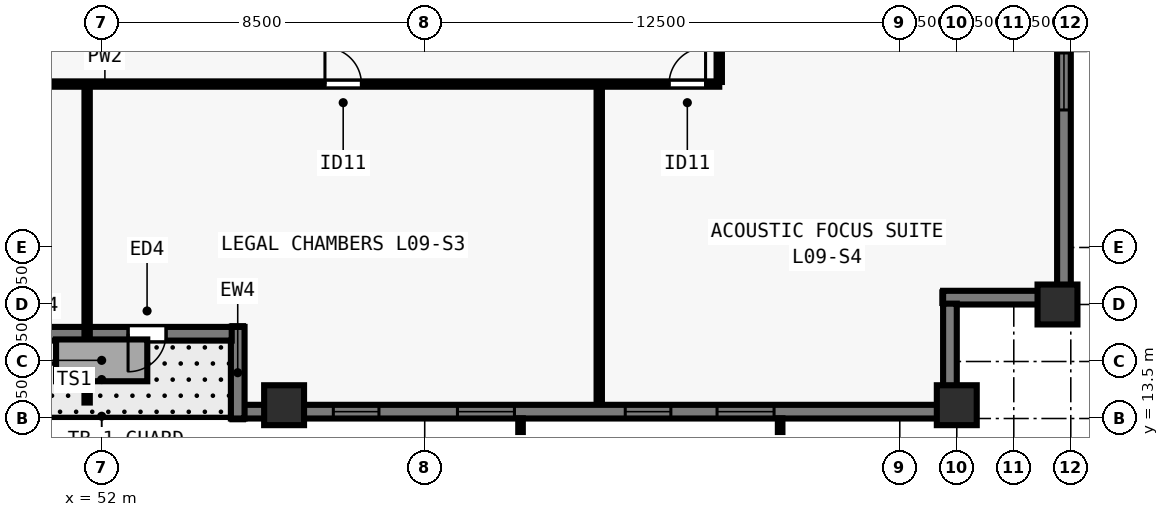
"""IFC4 building model, lengths in metres.
Left out: names, types, materials, properties, quantities, classifications, styles, units other than length and angle.
Written with IfcOpenShell. Run it as: python <this file> out.ifc"""

import sys

from ifc_helpers import new_model, si_unit, direction, frame, frame_2d, origin, origin_2d, place, context, subcontext, project, spatial, rectangle, extrude, element, fill, save


model = new_model("IFC4")
c1 = context("Model", 3, precision=1e-05, world=origin(), true_north=direction((0.0, 1.0)))
c2 = subcontext(c1, "Body", "Model", "MODEL_VIEW")
j1 = project(units=[si_unit("LENGTHUNIT", "METRE"), si_unit("PLANEANGLEUNIT", "RADIAN")], contexts=[c1])
p1 = place(None, origin())
s1 = spatial("IfcSite", under=j1, at=p1, CompositionType="ELEMENT")
p2 = place(p1, origin())
s2 = spatial("IfcBuilding", under=s1, at=p2, CompositionType="ELEMENT")
p3 = place(p2, frame((0.0, 0.0, 37.5)))
s3 = spatial("IfcBuildingStorey", under=s2, at=p3, CompositionType="ELEMENT", Elevation=37.5)
for number, where, z_axis, x_axis in (
    (1, (56.8, 13.85, 0.0), (0.0, 0.0, 1.0), (1.0, 0.0, 0.0)),
    (2, (74.5, 13.85, 0.0), (0.0, 0.0, 1.0), (1.0, 0.0, 0.0)),
    (3, (77.15, 16.5, 0.0), (0.0, 0.0, 1.0), (0.0, 1.0, 0.0)),
):
    element("IfcColumn", number, at=place(p3, frame(where, z_axis=z_axis, x_axis=x_axis)), inside=s3, PredefinedType="COLUMN", context=c2, shape_type="SweptSolid", body=[
        extrude(rectangle(XDim=1.05, YDim=1.05, at=origin_2d()), origin(), (0.0, 0.0, 1.0), 3.5),
    ])
p4 = place(p3, frame((77.32, 61.5, 0.0), z_axis=(0.0, 0.0, 1.0), x_axis=(0.0, -1.0, 0.0)))
e4 = element("IfcWall", 4, at=p4, inside=s3, PredefinedType="SOLIDWALL", context=c2, shape_type="SweptSolid", body=[
    extrude(rectangle(XDim=44.662, YDim=0.36, at=frame_2d((22.331, 0.0))), origin(), (0.0, 0.0, 1.0), 3.28),
])
p5 = place(p4, frame((4.78, 0.0, 0.8)))
e5 = element("IfcOpeningElement", 5, at=p5, cuts=e4, PredefinedType="OPENING", context=c2, shape_type="SweptSolid", body=[
    extrude(rectangle(XDim=1.5, YDim=1.544, at=frame_2d((0.75, 0.772))), frame((0.0, 0.19, 0.0), z_axis=(0.0, -1.0, 0.0), x_axis=(1.0, 0.0, 0.0)), (0.0, 0.0, 1.0), 0.38),
])
p6 = place(p4, frame((8.29, 0.0, 0.8)))
e6 = element("IfcOpeningElement", 6, at=p6, cuts=e4, PredefinedType="OPENING", context=c2, shape_type="SweptSolid", body=[
    extrude(rectangle(XDim=1.2, YDim=1.544, at=frame_2d((0.6, 0.772))), frame((0.0, 0.19, 0.0), z_axis=(0.0, -1.0, 0.0), x_axis=(1.0, 0.0, 0.0)), (0.0, 0.0, 1.0), 0.38),
])
p7 = place(p4, frame((11.5, 0.0, 0.8)))
e7 = element("IfcOpeningElement", 7, at=p7, cuts=e4, PredefinedType="OPENING", context=c2, shape_type="SweptSolid", body=[
    extrude(rectangle(XDim=1.5, YDim=1.544, at=frame_2d((0.75, 0.772))), frame((0.0, 0.19, 0.0), z_axis=(0.0, -1.0, 0.0), x_axis=(1.0, 0.0, 0.0)), (0.0, 0.0, 1.0), 0.38),
])
p8 = place(p4, frame((15.01, 0.0, 0.8)))
e8 = element("IfcOpeningElement", 8, at=p8, cuts=e4, PredefinedType="OPENING", context=c2, shape_type="SweptSolid", body=[
    extrude(rectangle(XDim=1.2, YDim=1.544, at=frame_2d((0.6, 0.772))), frame((0.0, 0.19, 0.0), z_axis=(0.0, -1.0, 0.0), x_axis=(1.0, 0.0, 0.0)), (0.0, 0.0, 1.0), 0.38),
])
p9 = place(p4, frame((18.671, 0.0, 0.8)))
e9 = element("IfcOpeningElement", 9, at=p9, cuts=e4, PredefinedType="OPENING", context=c2, shape_type="SweptSolid", body=[
    extrude(rectangle(XDim=1.5, YDim=1.544, at=frame_2d((0.75, 0.772))), frame((0.0, 0.19, 0.0), z_axis=(0.0, -1.0, 0.0), x_axis=(1.0, 0.0, 0.0)), (0.0, 0.0, 1.0), 0.38),
])
p10 = place(p4, frame((22.581, 0.0, 0.8)))
e10 = element("IfcOpeningElement", 10, at=p10, cuts=e4, PredefinedType="OPENING", context=c2, shape_type="SweptSolid", body=[
    extrude(rectangle(XDim=1.2, YDim=1.544, at=frame_2d((0.6, 0.772))), frame((0.0, 0.19, 0.0), z_axis=(0.0, -1.0, 0.0), x_axis=(1.0, 0.0, 0.0)), (0.0, 0.0, 1.0), 0.38),
])
p11 = place(p4, frame((24.941, 0.0, 0.8)))
e11 = element("IfcOpeningElement", 11, at=p11, cuts=e4, PredefinedType="OPENING", context=c2, shape_type="SweptSolid", body=[
    extrude(rectangle(XDim=1.5, YDim=1.544, at=frame_2d((0.75, 0.772))), frame((0.0, 0.19, 0.0), z_axis=(0.0, -1.0, 0.0), x_axis=(1.0, 0.0, 0.0)), (0.0, 0.0, 1.0), 0.38),
])
p12 = place(p4, frame((28.451, 0.0, 0.8)))
e12 = element("IfcOpeningElement", 12, at=p12, cuts=e4, PredefinedType="OPENING", context=c2, shape_type="SweptSolid", body=[
    extrude(rectangle(XDim=1.2, YDim=1.544, at=frame_2d((0.6, 0.772))), frame((0.0, 0.19, 0.0), z_axis=(0.0, -1.0, 0.0), x_axis=(1.0, 0.0, 0.0)), (0.0, 0.0, 1.0), 0.38),
])
p13 = place(p4, frame((31.662, 0.0, 0.8)))
e13 = element("IfcOpeningElement", 13, at=p13, cuts=e4, PredefinedType="OPENING", context=c2, shape_type="SweptSolid", body=[
    extrude(rectangle(XDim=1.5, YDim=1.544, at=frame_2d((0.75, 0.772))), frame((0.0, 0.19, 0.0), z_axis=(0.0, -1.0, 0.0), x_axis=(1.0, 0.0, 0.0)), (0.0, 0.0, 1.0), 0.38),
])
p14 = place(p4, frame((35.172, 0.0, 0.8)))
e14 = element("IfcOpeningElement", 14, at=p14, cuts=e4, PredefinedType="OPENING", context=c2, shape_type="SweptSolid", body=[
    extrude(rectangle(XDim=1.2, YDim=1.544, at=frame_2d((0.6, 0.772))), frame((0.0, 0.19, 0.0), z_axis=(0.0, -1.0, 0.0), x_axis=(1.0, 0.0, 0.0)), (0.0, 0.0, 1.0), 0.38),
])
p15 = place(p4, frame((38.382, 0.0, 0.8)))
e15 = element("IfcOpeningElement", 15, at=p15, cuts=e4, PredefinedType="OPENING", context=c2, shape_type="SweptSolid", body=[
    extrude(rectangle(XDim=1.5, YDim=1.544, at=frame_2d((0.75, 0.772))), frame((0.0, 0.19, 0.0), z_axis=(0.0, -1.0, 0.0), x_axis=(1.0, 0.0, 0.0)), (0.0, 0.0, 1.0), 0.38),
])
p16 = place(p3, frame((77.5, 16.68, 0.0), z_axis=(0.0, 0.0, 1.0), x_axis=(-1.0, 0.0, 0.0)))
e16 = element("IfcWall", 16, at=p16, inside=s3, PredefinedType="SOLIDWALL", context=c2, shape_type="SweptSolid", body=[
    extrude(rectangle(XDim=3.36, YDim=0.36, at=frame_2d((1.68, 0.0))), origin(), (0.0, 0.0, 1.0), 3.28),
])
p17 = place(p3, frame((74.32, 16.522, 0.0), z_axis=(0.0, 0.0, 1.0), x_axis=(0.0, -1.0, 0.0)))
e17 = element("IfcWall", 17, at=p17, inside=s3, PredefinedType="SOLIDWALL", context=c2, shape_type="SweptSolid", body=[
    extrude(rectangle(XDim=2.684, YDim=0.36, at=frame_2d((1.342, 0.0))), origin(), (0.0, 0.0, 1.0), 3.28),
])
p18 = place(p3, frame((74.5, 13.68, 0.0), z_axis=(0.0, 0.0, 1.0), x_axis=(-1.0, 0.0, 0.0)))
e18 = element("IfcWall", 18, at=p18, inside=s3, PredefinedType="SOLIDWALL", context=c2, shape_type="SweptSolid", body=[
    extrude(rectangle(XDim=18.762, YDim=0.36, at=frame_2d((9.381, 0.0))), origin(), (0.0, 0.0, 1.0), 3.28),
])
p19 = place(p18, frame((4.808, 0.0, 0.8)))
e19 = element("IfcOpeningElement", 19, at=p19, cuts=e18, PredefinedType="OPENING", context=c2, shape_type="SweptSolid", body=[
    extrude(rectangle(XDim=1.5, YDim=1.544, at=frame_2d((0.75, 0.772))), frame((0.0, 0.19, 0.0), z_axis=(0.0, -1.0, 0.0), x_axis=(1.0, 0.0, 0.0)), (0.0, 0.0, 1.0), 0.38),
])
p20 = place(p18, frame((7.523, 0.0, 0.8)))
e20 = element("IfcOpeningElement", 20, at=p20, cuts=e18, PredefinedType="OPENING", context=c2, shape_type="SweptSolid", body=[
    extrude(rectangle(XDim=1.2, YDim=1.544, at=frame_2d((0.6, 0.772))), frame((0.0, 0.19, 0.0), z_axis=(0.0, -1.0, 0.0), x_axis=(1.0, 0.0, 0.0)), (0.0, 0.0, 1.0), 0.38),
])
p21 = place(p18, frame((11.639, 0.0, 0.8)))
e21 = element("IfcOpeningElement", 21, at=p21, cuts=e18, PredefinedType="OPENING", context=c2, shape_type="SweptSolid", body=[
    extrude(rectangle(XDim=1.5, YDim=1.544, at=frame_2d((0.75, 0.772))), frame((0.0, 0.19, 0.0), z_axis=(0.0, -1.0, 0.0), x_axis=(1.0, 0.0, 0.0)), (0.0, 0.0, 1.0), 0.38),
])
p22 = place(p18, frame((15.204, 0.0, 0.8)))
e22 = element("IfcOpeningElement", 22, at=p22, cuts=e18, PredefinedType="OPENING", context=c2, shape_type="SweptSolid", body=[
    extrude(rectangle(XDim=1.2, YDim=1.544, at=frame_2d((0.6, 0.772))), frame((0.0, 0.19, 0.0), z_axis=(0.0, -1.0, 0.0), x_axis=(1.0, 0.0, 0.0)), (0.0, 0.0, 1.0), 0.38),
])
p23 = place(p3, frame((55.58, 13.5, 0.0), z_axis=(0.0, 0.0, 1.0), x_axis=(0.0, 1.0, 0.0)))
e23 = element("IfcWall", 23, at=p23, inside=s3, PredefinedType="SOLIDWALL", context=c2, shape_type="SweptSolid", body=[
    extrude(rectangle(XDim=2.41, YDim=0.36, at=frame_2d((1.205, 0.0))), origin(), (0.0, 0.0, 1.0), 3.28),
])
p24 = place(p3, frame((55.422, 15.73, 0.0), z_axis=(0.0, 0.0, 1.0), x_axis=(-1.0, 0.0, 0.0)))
e24 = element("IfcWall", 24, at=p24, inside=s3, PredefinedType="SOLIDWALL", context=c2, shape_type="SweptSolid", body=[
    extrude(rectangle(XDim=7.182, YDim=0.36, at=frame_2d((3.591, 0.0))), origin(), (0.0, 0.0, 1.0), 3.28),
])
p25 = place(p24, frame((1.727, 0.0, 0.0)))
e25 = element("IfcOpeningElement", 25, at=p25, cuts=e24, PredefinedType="OPENING", context=c2, shape_type="SweptSolid", body=[
    extrude(rectangle(XDim=1.0, YDim=2.15, at=frame_2d((0.5, 1.075))), frame((0.0, 0.19, 0.0), z_axis=(0.0, -1.0, 0.0), x_axis=(1.0, 0.0, 0.0)), (0.0, 0.0, 1.0), 0.38),
])
p26 = place(p3, frame((35.75, 22.3, 0.0), z_axis=(0.0, 0.0, 1.0), x_axis=(1.0, 0.0, 0.0)))
e26 = element("IfcWall", 26, at=p26, inside=s3, PredefinedType="PARTITIONING", context=c2, shape_type="SweptSolid", body=[
    extrude(rectangle(XDim=32.5, YDim=0.14, at=frame_2d((16.25, 0.0))), origin(), (0.0, 0.0, 1.0), 3.28),
])
p27 = place(p26, frame((1.604, 0.0, 0.0)))
e27 = element("IfcOpeningElement", 27, at=p27, cuts=e26, PredefinedType="OPENING", context=c2, shape_type="SweptSolid", body=[
    extrude(rectangle(XDim=0.96, YDim=2.12, at=frame_2d((0.48, 1.06))), frame((0.0, 0.08, 0.0), z_axis=(0.0, -1.0, 0.0), x_axis=(1.0, 0.0, 0.0)), (0.0, 0.0, 1.0), 0.16),
])
p28 = place(p26, frame((9.585, 0.0, 0.0)))
e28 = element("IfcOpeningElement", 28, at=p28, cuts=e26, PredefinedType="OPENING", context=c2, shape_type="SweptSolid", body=[
    extrude(rectangle(XDim=0.96, YDim=2.12, at=frame_2d((0.48, 1.06))), frame((0.0, 0.08, 0.0), z_axis=(0.0, -1.0, 0.0), x_axis=(1.0, 0.0, 0.0)), (0.0, 0.0, 1.0), 0.16),
])
p29 = place(p26, frame((22.125, 0.0, 0.0)))
e29 = element("IfcOpeningElement", 29, at=p29, cuts=e26, PredefinedType="OPENING", context=c2, shape_type="SweptSolid", body=[
    extrude(rectangle(XDim=0.96, YDim=2.12, at=frame_2d((0.48, 1.06))), frame((0.0, 0.08, 0.0), z_axis=(0.0, -1.0, 0.0), x_axis=(1.0, 0.0, 0.0)), (0.0, 0.0, 1.0), 0.16),
])
p30 = place(p26, frame((31.18, 0.0, 0.0)))
e30 = element("IfcOpeningElement", 30, at=p30, cuts=e26, PredefinedType="OPENING", context=c2, shape_type="SweptSolid", body=[
    extrude(rectangle(XDim=0.96, YDim=2.12, at=frame_2d((0.48, 1.06))), frame((0.0, 0.08, 0.0), z_axis=(0.0, -1.0, 0.0), x_axis=(1.0, 0.0, 0.0)), (0.0, 0.0, 1.0), 0.16),
])
p31 = place(p3, frame((68.25, 22.355, 0.0), z_axis=(0.0, 0.0, 1.0), x_axis=(0.0, 1.0, 0.0)))
e31 = element("IfcWall", 31, at=p31, inside=s3, PredefinedType="PARTITIONING", context=c2, shape_type="SweptSolid", body=[
    extrude(rectangle(XDim=33.29, YDim=0.14, at=frame_2d((16.645, 0.0))), origin(), (0.0, 0.0, 1.0), 3.28),
])
p32 = place(p31, frame((3.522, 0.0, 0.0)))
e32 = element("IfcOpeningElement", 32, at=p32, cuts=e31, PredefinedType="OPENING", context=c2, shape_type="SweptSolid", body=[
    extrude(rectangle(XDim=0.96, YDim=2.12, at=frame_2d((0.48, 1.06))), frame((0.0, 0.08, 0.0), z_axis=(0.0, -1.0, 0.0), x_axis=(1.0, 0.0, 0.0)), (0.0, 0.0, 1.0), 0.16),
])
p33 = place(p31, frame((11.956, 0.0, 0.0)))
e33 = element("IfcOpeningElement", 33, at=p33, cuts=e31, PredefinedType="OPENING", context=c2, shape_type="SweptSolid", body=[
    extrude(rectangle(XDim=0.96, YDim=2.12, at=frame_2d((0.48, 1.06))), frame((0.0, 0.08, 0.0), z_axis=(0.0, -1.0, 0.0), x_axis=(1.0, 0.0, 0.0)), (0.0, 0.0, 1.0), 0.16),
])
p34 = place(p31, frame((20.256, 0.0, 0.0)))
e34 = element("IfcOpeningElement", 34, at=p34, cuts=e31, PredefinedType="OPENING", context=c2, shape_type="SweptSolid", body=[
    extrude(rectangle(XDim=0.96, YDim=2.12, at=frame_2d((0.48, 1.06))), frame((0.0, 0.08, 0.0), z_axis=(0.0, -1.0, 0.0), x_axis=(1.0, 0.0, 0.0)), (0.0, 0.0, 1.0), 0.16),
])
p35 = place(p31, frame((28.422, 0.0, 0.0)))
e35 = element("IfcOpeningElement", 35, at=p35, cuts=e31, PredefinedType="OPENING", context=c2, shape_type="SweptSolid", body=[
    extrude(rectangle(XDim=0.96, YDim=2.12, at=frame_2d((0.48, 1.06))), frame((0.0, 0.08, 0.0), z_axis=(0.0, -1.0, 0.0), x_axis=(1.0, 0.0, 0.0)), (0.0, 0.0, 1.0), 0.16),
])
p36 = place(p3, frame((51.617, 13.92, 0.0), z_axis=(0.0, 0.0, 1.0), x_axis=(0.0, 1.0, 0.0)))
e36 = element("IfcWall", 36, at=p36, inside=s3, PredefinedType="PARTITIONING", context=c2, shape_type="SweptSolid", body=[
    extrude(rectangle(XDim=8.28, YDim=0.14, at=frame_2d((4.14, 0.0))), origin(), (0.0, 0.0, 1.0), 2.849),
])
p37 = place(p3, frame((65.093, 13.92, 0.0), z_axis=(0.0, 0.0, 1.0), x_axis=(0.0, 1.0, 0.0)))
e37 = element("IfcWall", 37, at=p37, inside=s3, PredefinedType="PARTITIONING", context=c2, shape_type="SweptSolid", body=[
    extrude(rectangle(XDim=8.28, YDim=0.14, at=frame_2d((4.14, 0.0))), origin(), (0.0, 0.0, 1.0), 3.28),
])
p38 = place(p15, origin())
e38 = element("IfcWindow", 38, at=p38, inside=s3, PartitioningType="SINGLE_PANEL", PredefinedType="WINDOW", context=c2, shape_type="SweptSolid", body=[
    extrude(rectangle(XDim=1.5, YDim=1.544, at=frame_2d((0.75, 0.772))), frame((0.0, -0.05, 0.0), z_axis=(0.0, -1.0, 0.0), x_axis=(1.0, 0.0, 0.0)), (0.0, 0.0, 1.0), 0.06),
])
fill(e15, e38)
p39 = place(p19, origin())
e39 = element("IfcWindow", 39, at=p39, inside=s3, PartitioningType="SINGLE_PANEL", PredefinedType="WINDOW", context=c2, shape_type="SweptSolid", body=[
    extrude(rectangle(XDim=1.5, YDim=1.544, at=frame_2d((0.75, 0.772))), frame((0.0, -0.05, 0.0), z_axis=(0.0, -1.0, 0.0), x_axis=(1.0, 0.0, 0.0)), (0.0, 0.0, 1.0), 0.06),
])
fill(e19, e39)
p40 = place(p20, origin())
e40 = element("IfcWindow", 40, at=p40, inside=s3, PartitioningType="SINGLE_PANEL", PredefinedType="WINDOW", context=c2, shape_type="SweptSolid", body=[
    extrude(rectangle(XDim=1.2, YDim=1.544, at=frame_2d((0.6, 0.772))), frame((0.0, -0.05, 0.0), z_axis=(0.0, -1.0, 0.0), x_axis=(1.0, 0.0, 0.0)), (0.0, 0.0, 1.0), 0.06),
])
fill(e20, e40)
p41 = place(p21, origin())
e41 = element("IfcWindow", 41, at=p41, inside=s3, PartitioningType="SINGLE_PANEL", PredefinedType="WINDOW", context=c2, shape_type="SweptSolid", body=[
    extrude(rectangle(XDim=1.5, YDim=1.544, at=frame_2d((0.75, 0.772))), frame((0.0, -0.05, 0.0), z_axis=(0.0, -1.0, 0.0), x_axis=(1.0, 0.0, 0.0)), (0.0, 0.0, 1.0), 0.06),
])
fill(e21, e41)
p42 = place(p22, origin())
e42 = element("IfcWindow", 42, at=p42, inside=s3, PartitioningType="SINGLE_PANEL", PredefinedType="WINDOW", context=c2, shape_type="SweptSolid", body=[
    extrude(rectangle(XDim=1.2, YDim=1.544, at=frame_2d((0.6, 0.772))), frame((0.0, -0.05, 0.0), z_axis=(0.0, -1.0, 0.0), x_axis=(1.0, 0.0, 0.0)), (0.0, 0.0, 1.0), 0.06),
])
fill(e22, e42)
p43 = place(p25, origin())
e43 = element("IfcDoor", 43, at=p43, inside=s3, OperationType="SINGLE_SWING_RIGHT", PredefinedType="DOOR", context=c2, shape_type="SweptSolid", body=[
    extrude(rectangle(XDim=1.0, YDim=2.15, at=frame_2d((0.5, 1.075))), frame((0.0, 0.025, 0.0), z_axis=(0.0, -1.0, 0.0), x_axis=(1.0, 0.0, 0.0)), (0.0, 0.0, 1.0), 0.05),
])
fill(e25, e43)
p44 = place(p29, origin())
e44 = element("IfcDoor", 44, at=p44, inside=s3, OperationType="SINGLE_SWING_LEFT", PredefinedType="DOOR", context=c2, shape_type="SweptSolid", body=[
    extrude(rectangle(XDim=0.96, YDim=2.12, at=frame_2d((0.48, 1.06))), frame((0.0, 0.025, 0.0), z_axis=(0.0, -1.0, 0.0), x_axis=(1.0, 0.0, 0.0)), (0.0, 0.0, 1.0), 0.05),
])
fill(e29, e44)
p45 = place(p30, origin())
e45 = element("IfcDoor", 45, at=p45, inside=s3, OperationType="SINGLE_SWING_RIGHT", PredefinedType="DOOR", context=c2, shape_type="SweptSolid", body=[
    extrude(rectangle(XDim=0.96, YDim=2.12, at=frame_2d((0.48, 1.06))), frame((0.0, 0.025, 0.0), z_axis=(0.0, -1.0, 0.0), x_axis=(1.0, 0.0, 0.0)), (0.0, 0.0, 1.0), 0.05),
])
fill(e30, e45)
save(model, sys.argv[1])
